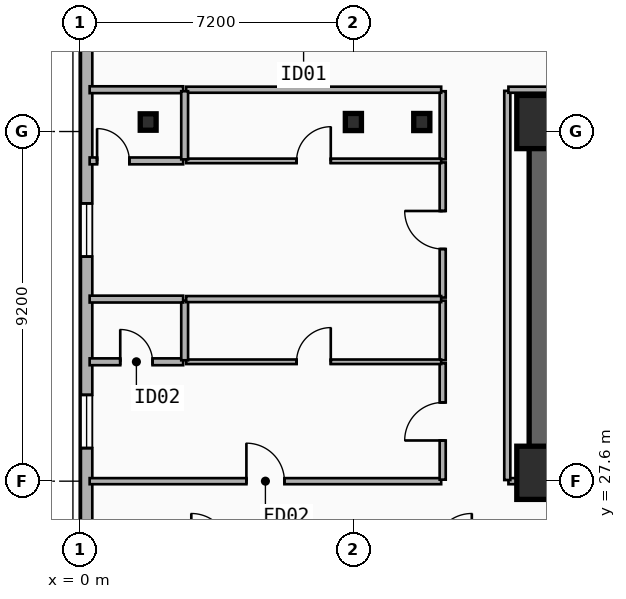
"""IFC4 building model, lengths in metres.
Left out: names, types, materials, properties, quantities, classifications, styles, units other than length and angle.
Written with IfcOpenShell. Run it as: python <this file> out.ifc"""

import sys

from ifc_helpers import new_model, si_unit, direction, frame, frame_2d, origin, origin_2d, place, context, subcontext, project, spatial, rectangle, i_section, extrude, element, fill, save


model = new_model("IFC4")
c1 = context("Model", 3, precision=1e-05, world=origin(), true_north=direction((0.0, 1.0)))
c2 = subcontext(c1, "Body", "Model", "MODEL_VIEW")
j1 = project(units=[si_unit("LENGTHUNIT", "METRE"), si_unit("PLANEANGLEUNIT", "RADIAN")], contexts=[c1])
p1 = place(None, origin())
s1 = spatial("IfcSite", under=j1, at=p1, CompositionType="ELEMENT")
p2 = place(p1, origin())
s2 = spatial("IfcBuilding", under=s1, at=p2, CompositionType="ELEMENT")
p3 = place(p2, frame((0.0, 0.0, 82.8)))
s3 = spatial("IfcBuildingStorey", under=s2, at=p3, CompositionType="ELEMENT", Elevation=82.8)
p4 = place(p3, frame((12.15, 37.05, 0.0), z_axis=(0.0, 0.0, 1.0), x_axis=(1.0, 0.0, 0.0)))
e1 = element("IfcWall", 1, at=p4, inside=s3, PredefinedType="SHEAR", context=c2, shape_type="SweptSolid", body=[
    extrude(rectangle(XDim=33.23, YDim=0.65, at=frame_2d((16.615, 0.0))), origin(), (0.0, 0.0, 1.0), 3.5),
])
p5 = place(p3, frame((21.18, 27.82, 0.0), z_axis=(0.0, 0.0, 1.0), x_axis=(-1.0, 0.0, 0.0)))
e2 = element("IfcWall", 2, at=p5, inside=s3, PredefinedType="SHEAR", context=c2, shape_type="SweptSolid", body=[
    extrude(rectangle(XDim=9.03, YDim=0.65, at=frame_2d((4.515, 0.0))), origin(), (0.0, 0.0, 1.0), 3.5),
])
p6 = place(p5, frame((2.68, 0.0, 0.0)))
e3 = element("IfcOpeningElement", 3, at=p6, cuts=e2, PredefinedType="OPENING", context=c2, shape_type="SweptSolid", body=[
    extrude(rectangle(XDim=1.1, YDim=2.15, at=frame_2d((0.55, 1.075))), frame((0.0, 0.335, 0.0), z_axis=(0.0, -1.0, 0.0), x_axis=(1.0, 0.0, 0.0)), (0.0, 0.0, 1.0), 0.67),
])
p7 = place(p3, frame((12.15, 28.145, 0.0), z_axis=(0.0, 0.0, 1.0), x_axis=(0.0, 1.0, 0.0)))
e4 = element("IfcWall", 4, at=p7, inside=s3, PredefinedType="SHEAR", context=c2, shape_type="SweptSolid", body=[
    extrude(rectangle(XDim=8.58, YDim=0.65, at=frame_2d((4.29, 0.0))), origin(), (0.0, 0.0, 1.0), 3.5),
])
for number, where, z_axis, x_axis in (
    (5, (12.2, 27.82, 0.0), (0.0, 0.0, 1.0), (1.0, 0.0, 0.0)),
    (6, (12.2, 37.05, 0.0), (0.0, 0.0, 1.0), (1.0, 0.0, 0.0)),
):
    element("IfcColumn", number, at=place(p3, frame(where, z_axis=z_axis, x_axis=x_axis)), inside=s3, PredefinedType="COLUMN", context=c2, shape_type="SweptSolid", body=[
        extrude(rectangle(XDim=1.4, YDim=1.4, at=origin_2d()), origin(), (0.0, 0.0, 1.0), 3.5),
    ])
p8 = place(p3, frame((9.0, 37.05, 0.0), z_axis=(0.0, 0.0, 1.0), x_axis=(1.0, 0.0, 0.0)))
e7 = element("IfcColumn", 7, at=p8, inside=s3, PredefinedType="COLUMN", context=c2, shape_type="SweptSolid", body=[
    extrude(i_section(OverallWidth=0.424, OverallDepth=0.45, WebThickness=0.041, FlangeThickness=0.065, FilletRadius=0.015, at=origin_2d()), origin(), (0.0, 0.0, 1.0), 3.5),
])
p9 = place(p3, frame((1.8, 37.05, 0.0), z_axis=(0.0, 0.0, 1.0), x_axis=(1.0, 0.0, 0.0)))
e8 = element("IfcColumn", 8, at=p9, inside=s3, PredefinedType="COLUMN", context=c2, shape_type="SweptSolid", body=[
    extrude(i_section(OverallWidth=0.418, OverallDepth=0.432, WebThickness=0.035, FlangeThickness=0.056, FilletRadius=0.015, at=origin_2d()), origin(), (0.0, 0.0, 1.0), 3.5),
])
p10 = place(p3, frame((7.2, 37.05, 0.0), z_axis=(0.0, 0.0, 1.0), x_axis=(1.0, 0.0, 0.0)))
e9 = element("IfcColumn", 9, at=p10, inside=s3, PredefinedType="COLUMN", context=c2, shape_type="SweptSolid", body=[
    extrude(i_section(OverallWidth=0.424, OverallDepth=0.45, WebThickness=0.041, FlangeThickness=0.065, FilletRadius=0.015, at=origin_2d()), origin(), (0.0, 0.0, 1.0), 3.5),
])
p11 = place(p3, frame((0.18, 21.0, 0.0), z_axis=(0.0, 0.0, 1.0), x_axis=(0.0, 1.0, 0.0)))
e10 = element("IfcWall", 10, at=p11, inside=s3, PredefinedType="SOLIDWALL", context=c2, shape_type="SweptSolid", body=[
    extrude(rectangle(XDim=18.0, YDim=0.3, at=frame_2d((9.0, 0.0))), origin(), (0.0, 0.0, 1.0), 3.24),
])
p12 = place(p11, frame((7.47, 0.0, 0.48)))
e11 = element("IfcOpeningElement", 11, at=p12, cuts=e10, PredefinedType="OPENING", context=c2, shape_type="SweptSolid", body=[
    extrude(rectangle(XDim=1.4, YDim=1.8, at=frame_2d((0.7, 0.9))), frame((0.0, 0.16, 0.0), z_axis=(0.0, -1.0, 0.0), x_axis=(1.0, 0.0, 0.0)), (0.0, 0.0, 1.0), 0.32),
])
p13 = place(p11, frame((12.509, 0.0, 0.48)))
e12 = element("IfcOpeningElement", 12, at=p13, cuts=e10, PredefinedType="OPENING", context=c2, shape_type="SweptSolid", body=[
    extrude(rectangle(XDim=1.4, YDim=1.8, at=frame_2d((0.7, 0.9))), frame((0.0, 0.16, 0.0), z_axis=(0.0, -1.0, 0.0), x_axis=(1.0, 0.0, 0.0)), (0.0, 0.0, 1.0), 0.32),
])
p14 = place(p11, frame((0.32, 0.0, 0.65)))
e13 = element("IfcOpeningElement", 13, at=p14, cuts=e10, PredefinedType="OPENING", context=c2, shape_type="SweptSolid", body=[
    extrude(rectangle(XDim=1.4, YDim=1.8, at=frame_2d((0.7, 0.9))), frame((0.0, 0.16, 0.0), z_axis=(0.0, -1.0, 0.0), x_axis=(1.0, 0.0, 0.0)), (0.0, 0.0, 1.0), 0.32),
])
p15 = place(p3, frame((0.26, 27.6, 0.0), z_axis=(0.0, 0.0, 1.0), x_axis=(1.0, 0.0, 0.0)))
e14 = element("IfcWall", 14, at=p15, inside=s3, PredefinedType="PARTITIONING", context=c2, shape_type="SweptSolid", body=[
    extrude(rectangle(XDim=9.25, YDim=0.16, at=frame_2d((4.625, 0.0))), origin(), (0.0, 0.0, 1.0), 2.57),
])
p16 = place(p15, frame((4.125, 0.0, 0.0)))
e15 = element("IfcOpeningElement", 15, at=p16, cuts=e14, PredefinedType="OPENING", context=c2, shape_type="SweptSolid", body=[
    extrude(rectangle(XDim=1.0, YDim=2.15, at=frame_2d((0.5, 1.075))), frame((0.0, 0.09, 0.0), z_axis=(0.0, -1.0, 0.0), x_axis=(1.0, 0.0, 0.0)), (0.0, 0.0, 1.0), 0.18),
])
p17 = place(p3, frame((9.55, 27.64, 0.0), z_axis=(0.0, 0.0, 1.0), x_axis=(0.0, 1.0, 0.0)))
e16 = element("IfcWall", 16, at=p17, inside=s3, PredefinedType="PARTITIONING", context=c2, shape_type="SweptSolid", body=[
    extrude(rectangle(XDim=3.061, YDim=0.16, at=frame_2d((1.531, 0.0))), origin(), (0.0, 0.0, 1.0), 3.24),
])
p18 = place(p17, frame((1.031, 0.0, 0.0)))
e17 = element("IfcOpeningElement", 17, at=p18, cuts=e16, PredefinedType="OPENING", context=c2, shape_type="SweptSolid", body=[
    extrude(rectangle(XDim=1.0, YDim=2.15, at=frame_2d((0.5, 1.075))), frame((0.0, 0.09, 0.0), z_axis=(0.0, -1.0, 0.0), x_axis=(1.0, 0.0, 0.0)), (0.0, 0.0, 1.0), 0.18),
])
p19 = place(p3, frame((9.55, 30.781, 0.0), z_axis=(0.0, 0.0, 1.0), x_axis=(0.0, 1.0, 0.0)))
e18 = element("IfcWall", 18, at=p19, inside=s3, PredefinedType="PARTITIONING", context=c2, shape_type="SweptSolid", body=[
    extrude(rectangle(XDim=1.57, YDim=0.16, at=frame_2d((0.785, 0.0))), origin(), (0.0, 0.0, 1.0), 3.24),
])
p20 = place(p3, frame((9.55, 32.431, 0.0), z_axis=(0.0, 0.0, 1.0), x_axis=(0.0, 1.0, 0.0)))
e19 = element("IfcWall", 19, at=p20, inside=s3, PredefinedType="PARTITIONING", context=c2, shape_type="SweptSolid", body=[
    extrude(rectangle(XDim=3.556, YDim=0.16, at=frame_2d((1.778, 0.0))), origin(), (0.0, 0.0, 1.0), 3.24),
])
p21 = place(p20, frame((1.278, 0.0, 0.0)))
e20 = element("IfcOpeningElement", 20, at=p21, cuts=e19, PredefinedType="OPENING", context=c2, shape_type="SweptSolid", body=[
    extrude(rectangle(XDim=1.0, YDim=2.15, at=frame_2d((0.5, 1.075))), frame((0.0, 0.09, 0.0), z_axis=(0.0, -1.0, 0.0), x_axis=(1.0, 0.0, 0.0)), (0.0, 0.0, 1.0), 0.18),
])
p22 = place(p3, frame((9.55, 36.067, 0.0), z_axis=(0.0, 0.0, 1.0), x_axis=(0.0, 1.0, 0.0)))
e21 = element("IfcWall", 21, at=p22, inside=s3, PredefinedType="PARTITIONING", context=c2, shape_type="SweptSolid", body=[
    extrude(rectangle(XDim=1.793, YDim=0.16, at=frame_2d((0.896, 0.0))), origin(), (0.0, 0.0, 1.0), 2.72),
])
p23 = place(p3, frame((0.26, 37.9, 0.0), z_axis=(0.0, 0.0, 1.0), x_axis=(1.0, 0.0, 0.0)))
e22 = element("IfcWall", 22, at=p23, inside=s3, PredefinedType="PLUMBINGWALL", context=c2, shape_type="SweptSolid", body=[
    extrude(rectangle(XDim=2.46, YDim=0.18, at=frame_2d((1.23, 0.0))), origin(), (0.0, 0.0, 1.0), 3.24),
])
p24 = place(p3, frame((2.8, 37.9, 0.0), z_axis=(0.0, 0.0, 1.0), x_axis=(1.0, 0.0, 0.0)))
e23 = element("IfcWall", 23, at=p24, inside=s3, PredefinedType="PARTITIONING", context=c2, shape_type="SweptSolid", body=[
    extrude(rectangle(XDim=6.71, YDim=0.16, at=frame_2d((3.355, 0.0))), origin(), (0.0, 0.0, 1.0), 3.24),
])
p25 = place(p3, frame((0.26, 30.741, 0.0), z_axis=(0.0, 0.0, 1.0), x_axis=(1.0, 0.0, 0.0)))
e24 = element("IfcWall", 24, at=p25, inside=s3, PredefinedType="PLUMBINGWALL", context=c2, shape_type="SweptSolid", body=[
    extrude(rectangle(XDim=2.46, YDim=0.18, at=frame_2d((1.23, 0.0))), origin(), (0.0, 0.0, 1.0), 2.57),
])
p26 = place(p25, frame((0.805, 0.0, 0.0)))
e25 = element("IfcOpeningElement", 25, at=p26, cuts=e24, PredefinedType="OPENING", context=c2, shape_type="SweptSolid", body=[
    extrude(rectangle(XDim=0.85, YDim=2.1, at=frame_2d((0.425, 1.05))), frame((0.0, 0.1, 0.0), z_axis=(0.0, -1.0, 0.0), x_axis=(1.0, 0.0, 0.0)), (0.0, 0.0, 1.0), 0.2),
])
p27 = place(p3, frame((2.8, 30.741, 0.0), z_axis=(0.0, 0.0, 1.0), x_axis=(1.0, 0.0, 0.0)))
e26 = element("IfcWall", 26, at=p27, inside=s3, PredefinedType="PARTITIONING", context=c2, shape_type="SweptSolid", body=[
    extrude(rectangle(XDim=6.71, YDim=0.12, at=frame_2d((3.355, 0.0))), origin(), (0.0, 0.0, 1.0), 2.57),
])
p28 = place(p27, frame((2.905, 0.0, 0.0)))
e27 = element("IfcOpeningElement", 27, at=p28, cuts=e26, PredefinedType="OPENING", context=c2, shape_type="SweptSolid", body=[
    extrude(rectangle(XDim=0.9, YDim=2.1, at=frame_2d((0.45, 1.05))), frame((0.0, 0.07, 0.0), z_axis=(0.0, -1.0, 0.0), x_axis=(1.0, 0.0, 0.0)), (0.0, 0.0, 1.0), 0.14),
])
p29 = place(p3, frame((2.76, 30.781, 0.0), z_axis=(0.0, 0.0, 1.0), x_axis=(0.0, 1.0, 0.0)))
e28 = element("IfcWall", 28, at=p29, inside=s3, PredefinedType="PLUMBINGWALL", context=c2, shape_type="SweptSolid", body=[
    extrude(rectangle(XDim=1.57, YDim=0.18, at=frame_2d((0.785, 0.0))), origin(), (0.0, 0.0, 1.0), 3.24),
])
p30 = place(p3, frame((0.26, 32.391, 0.0), z_axis=(0.0, 0.0, 1.0), x_axis=(1.0, 0.0, 0.0)))
e29 = element("IfcWall", 29, at=p30, inside=s3, PredefinedType="PLUMBINGWALL", context=c2, shape_type="SweptSolid", body=[
    extrude(rectangle(XDim=2.46, YDim=0.18, at=frame_2d((1.23, 0.0))), origin(), (0.0, 0.0, 1.0), 2.57),
])
p31 = place(p3, frame((2.8, 32.391, 0.0), z_axis=(0.0, 0.0, 1.0), x_axis=(1.0, 0.0, 0.0)))
e30 = element("IfcWall", 30, at=p31, inside=s3, PredefinedType="PARTITIONING", context=c2, shape_type="SweptSolid", body=[
    extrude(rectangle(XDim=6.71, YDim=0.16, at=frame_2d((3.355, 0.0))), origin(), (0.0, 0.0, 1.0), 2.57),
])
p32 = place(p3, frame((0.26, 36.027, 0.0), z_axis=(0.0, 0.0, 1.0), x_axis=(1.0, 0.0, 0.0)))
e31 = element("IfcWall", 31, at=p32, inside=s3, PredefinedType="PLUMBINGWALL", context=c2, shape_type="SweptSolid", body=[
    extrude(rectangle(XDim=2.46, YDim=0.18, at=frame_2d((1.23, 0.0))), origin(), (0.0, 0.0, 1.0), 2.57),
])
p33 = place(p32, frame((0.195, 0.0, 0.0)))
e32 = element("IfcOpeningElement", 32, at=p33, cuts=e31, PredefinedType="OPENING", context=c2, shape_type="SweptSolid", body=[
    extrude(rectangle(XDim=0.85, YDim=2.1, at=frame_2d((0.425, 1.05))), frame((0.0, 0.1, 0.0), z_axis=(0.0, -1.0, 0.0), x_axis=(1.0, 0.0, 0.0)), (0.0, 0.0, 1.0), 0.2),
])
p34 = place(p3, frame((2.8, 36.027, 0.0), z_axis=(0.0, 0.0, 1.0), x_axis=(1.0, 0.0, 0.0)))
e33 = element("IfcWall", 33, at=p34, inside=s3, PredefinedType="PARTITIONING", context=c2, shape_type="SweptSolid", body=[
    extrude(rectangle(XDim=6.71, YDim=0.12, at=frame_2d((3.355, 0.0))), origin(), (0.0, 0.0, 1.0), 2.57),
])
p35 = place(p34, frame((2.905, 0.0, 0.0)))
e34 = element("IfcOpeningElement", 34, at=p35, cuts=e33, PredefinedType="OPENING", context=c2, shape_type="SweptSolid", body=[
    extrude(rectangle(XDim=0.9, YDim=2.1, at=frame_2d((0.45, 1.05))), frame((0.0, 0.07, 0.0), z_axis=(0.0, -1.0, 0.0), x_axis=(1.0, 0.0, 0.0)), (0.0, 0.0, 1.0), 0.14),
])
p36 = place(p3, frame((2.76, 36.067, 0.0), z_axis=(0.0, 0.0, 1.0), x_axis=(0.0, 1.0, 0.0)))
e35 = element("IfcWall", 35, at=p36, inside=s3, PredefinedType="PLUMBINGWALL", context=c2, shape_type="SweptSolid", body=[
    extrude(rectangle(XDim=1.793, YDim=0.18, at=frame_2d((0.896, 0.0))), origin(), (0.0, 0.0, 1.0), 2.72),
])
p37 = place(p3, frame((11.28, 27.6, 0.0), z_axis=(0.0, 0.0, 1.0), x_axis=(1.0, 0.0, 0.0)))
e36 = element("IfcWall", 36, at=p37, inside=s3, PredefinedType="PARTITIONING", context=c2, shape_type="SweptSolid", body=[
    extrude(rectangle(XDim=0.84, YDim=0.16, at=frame_2d((0.42, 0.0))), origin(), (0.0, 0.0, 1.0), 2.28),
])
p38 = place(p3, frame((11.25, 27.63, 0.0), z_axis=(0.0, 0.0, 1.0), x_axis=(0.0, 1.0, 0.0)))
e37 = element("IfcWall", 37, at=p38, inside=s3, PredefinedType="PARTITIONING", context=c2, shape_type="SweptSolid", body=[
    extrude(rectangle(XDim=10.24, YDim=0.16, at=frame_2d((5.12, 0.0))), origin(), (0.0, 0.0, 1.0), 2.72),
])
p39 = place(p3, frame((11.28, 37.9, 0.0), z_axis=(0.0, 0.0, 1.0), x_axis=(1.0, 0.0, 0.0)))
e38 = element("IfcWall", 38, at=p39, inside=s3, PredefinedType="PARTITIONING", context=c2, shape_type="SweptSolid", body=[
    extrude(rectangle(XDim=35.04, YDim=0.16, at=frame_2d((17.52, 0.0))), origin(), (0.0, 0.0, 1.0), 3.24),
])
p40 = place(p12, origin())
e39 = element("IfcWindow", 39, at=p40, inside=s3, PartitioningType="SINGLE_PANEL", PredefinedType="WINDOW", context=c2, shape_type="SweptSolid", body=[
    extrude(rectangle(XDim=1.4, YDim=1.8, at=frame_2d((0.7, 0.9))), frame((0.0, 0.03, 0.0), z_axis=(0.0, -1.0, 0.0), x_axis=(1.0, 0.0, 0.0)), (0.0, 0.0, 1.0), 0.06),
])
fill(e11, e39)
p41 = place(p13, origin())
e40 = element("IfcWindow", 40, at=p41, inside=s3, PartitioningType="SINGLE_PANEL", PredefinedType="WINDOW", context=c2, shape_type="SweptSolid", body=[
    extrude(rectangle(XDim=1.4, YDim=1.8, at=frame_2d((0.7, 0.9))), frame((0.0, 0.03, 0.0), z_axis=(0.0, -1.0, 0.0), x_axis=(1.0, 0.0, 0.0)), (0.0, 0.0, 1.0), 0.06),
])
fill(e12, e40)
p42 = place(p16, origin())
e41 = element("IfcDoor", 41, at=p42, inside=s3, OperationType="SINGLE_SWING_LEFT", PredefinedType="DOOR", context=c2, shape_type="SweptSolid", body=[
    extrude(rectangle(XDim=1.0, YDim=2.15, at=frame_2d((0.5, 1.075))), frame((0.0, 0.025, 0.0), z_axis=(0.0, -1.0, 0.0), x_axis=(1.0, 0.0, 0.0)), (0.0, 0.0, 1.0), 0.05),
])
fill(e15, e41)
p43 = place(p18, origin())
e42 = element("IfcDoor", 42, at=p43, inside=s3, OperationType="SINGLE_SWING_LEFT", PredefinedType="DOOR", context=c2, shape_type="SweptSolid", body=[
    extrude(rectangle(XDim=1.0, YDim=2.15, at=frame_2d((0.5, 1.075))), frame((0.0, 0.025, 0.0), z_axis=(0.0, -1.0, 0.0), x_axis=(1.0, 0.0, 0.0)), (0.0, 0.0, 1.0), 0.05),
])
fill(e17, e42)
p44 = place(p21, origin())
e43 = element("IfcDoor", 43, at=p44, inside=s3, OperationType="SINGLE_SWING_RIGHT", PredefinedType="DOOR", context=c2, shape_type="SweptSolid", body=[
    extrude(rectangle(XDim=1.0, YDim=2.15, at=frame_2d((0.5, 1.075))), frame((0.0, 0.025, 0.0), z_axis=(0.0, -1.0, 0.0), x_axis=(1.0, 0.0, 0.0)), (0.0, 0.0, 1.0), 0.05),
])
fill(e20, e43)
p45 = place(p26, origin())
e44 = element("IfcDoor", 44, at=p45, inside=s3, OperationType="SINGLE_SWING_LEFT", PredefinedType="DOOR", context=c2, shape_type="SweptSolid", body=[
    extrude(rectangle(XDim=0.85, YDim=2.1, at=frame_2d((0.425, 1.05))), frame((0.0, 0.025, 0.0), z_axis=(0.0, -1.0, 0.0), x_axis=(1.0, 0.0, 0.0)), (0.0, 0.0, 1.0), 0.05),
])
fill(e25, e44)
p46 = place(p28, origin())
e45 = element("IfcDoor", 45, at=p46, inside=s3, OperationType="SINGLE_SWING_RIGHT", PredefinedType="DOOR", context=c2, shape_type="SweptSolid", body=[
    extrude(rectangle(XDim=0.9, YDim=2.1, at=frame_2d((0.45, 1.05))), frame((0.0, 0.025, 0.0), z_axis=(0.0, -1.0, 0.0), x_axis=(1.0, 0.0, 0.0)), (0.0, 0.0, 1.0), 0.05),
])
fill(e27, e45)
p47 = place(p33, origin())
e46 = element("IfcDoor", 46, at=p47, inside=s3, OperationType="SINGLE_SWING_LEFT", PredefinedType="DOOR", context=c2, shape_type="SweptSolid", body=[
    extrude(rectangle(XDim=0.85, YDim=2.1, at=frame_2d((0.425, 1.05))), frame((0.0, 0.025, 0.0), z_axis=(0.0, -1.0, 0.0), x_axis=(1.0, 0.0, 0.0)), (0.0, 0.0, 1.0), 0.05),
])
fill(e32, e46)
p48 = place(p35, origin())
e47 = element("IfcDoor", 47, at=p48, inside=s3, OperationType="SINGLE_SWING_RIGHT", PredefinedType="DOOR", context=c2, shape_type="SweptSolid", body=[
    extrude(rectangle(XDim=0.9, YDim=2.1, at=frame_2d((0.45, 1.05))), frame((0.0, 0.025, 0.0), z_axis=(0.0, -1.0, 0.0), x_axis=(1.0, 0.0, 0.0)), (0.0, 0.0, 1.0), 0.05),
])
fill(e34, e47)
save(model, sys.argv[1])
